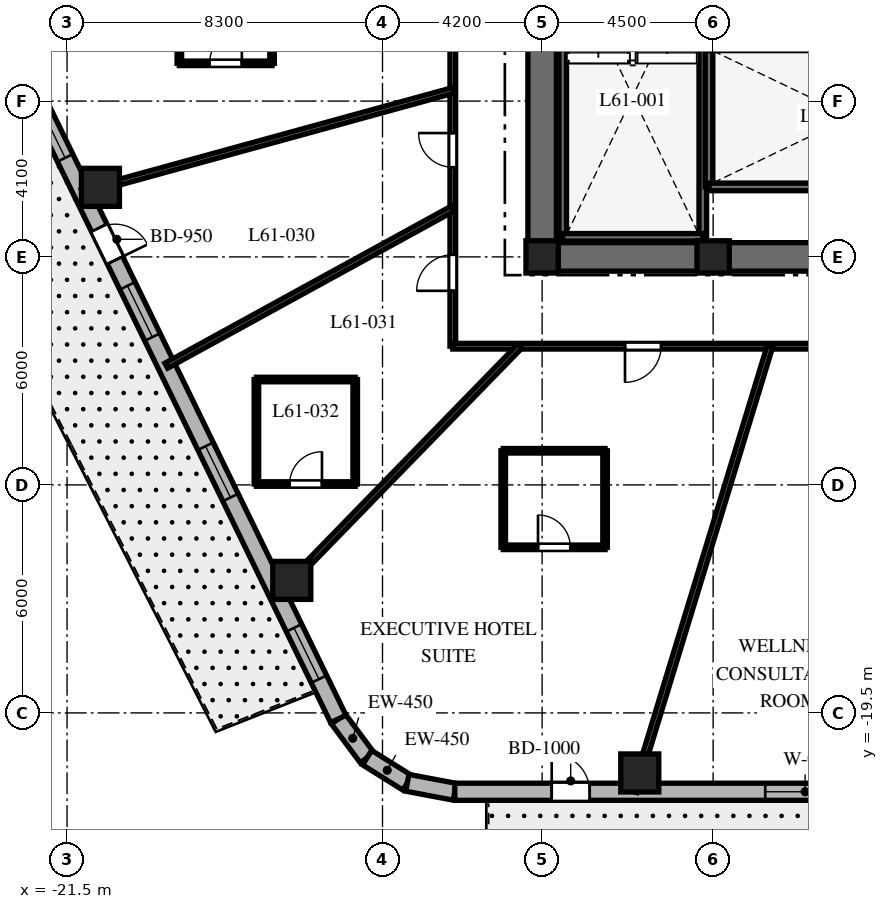
"""IFC4 building model, lengths in metres.
Left out: names, types, materials, properties, quantities, classifications, styles, units other than length and angle.
Written with IfcOpenShell. Run it as: python <this file> out.ifc"""

import sys

from ifc_helpers import new_model, si_unit, direction, frame, frame_2d, origin, origin_2d, place, context, subcontext, project, spatial, rectangle, extrude, element, fill, save


model = new_model("IFC4")
c1 = context("Model", 3, precision=1e-05, world=origin(), true_north=direction((0.0, 1.0)))
c2 = subcontext(c1, "Body", "Model", "MODEL_VIEW")
j1 = project(units=[si_unit("LENGTHUNIT", "METRE"), si_unit("PLANEANGLEUNIT", "RADIAN")], contexts=[c1])
p1 = place(None, origin())
s1 = spatial("IfcSite", under=j1, at=p1, CompositionType="ELEMENT")
p2 = place(p1, origin())
s2 = spatial("IfcBuilding", under=s1, at=p2, CompositionType="ELEMENT")
p3 = place(p2, frame((0.0, 0.0, 244.5)))
s3 = spatial("IfcBuildingStorey", under=s2, at=p3, CompositionType="ELEMENT", Elevation=244.5)
p4 = place(p3, frame((-9.375, -7.5, 0.0), z_axis=(0.0, 0.0, 1.0), x_axis=(1.0, 0.0, 0.0)))
e1 = element("IfcWall", 1, at=p4, inside=s3, PredefinedType="SHEAR", context=c2, shape_type="SweptSolid", body=[
    extrude(rectangle(XDim=18.75, YDim=0.75, at=frame_2d((9.375, 0.0))), origin(), (0.0, 0.0, 1.0), 3.8),
])
p5 = place(p4, frame((9.425, 0.0, 0.0)))
e2 = element("IfcOpeningElement", 2, at=p5, cuts=e1, PredefinedType="OPENING", context=c2, shape_type="SweptSolid", body=[
    extrude(rectangle(XDim=1.0, YDim=2.15, at=frame_2d((0.5, 1.075))), frame((0.0, 0.385, 0.0), z_axis=(0.0, -1.0, 0.0), x_axis=(1.0, 0.0, 0.0)), (0.0, 0.0, 1.0), 0.77),
])
p6 = place(p3, frame((-9.0, -7.125, 0.0), z_axis=(0.0, 0.0, 1.0), x_axis=(0.0, 1.0, 0.0)))
e3 = element("IfcWall", 3, at=p6, inside=s3, PredefinedType="SHEAR", context=c2, shape_type="SweptSolid", body=[
    extrude(rectangle(XDim=14.25, YDim=0.75, at=frame_2d((7.125, 0.0))), origin(), (0.0, 0.0, 1.0), 3.8),
])
p7 = place(p6, frame((10.25, 0.0, 0.0)))
e4 = element("IfcOpeningElement", 4, at=p7, cuts=e3, PredefinedType="OPENING", context=c2, shape_type="SweptSolid", body=[
    extrude(rectangle(XDim=1.05, YDim=2.15, at=frame_2d((0.525, 1.075))), frame((0.0, 0.385, 0.0), z_axis=(0.0, -1.0, 0.0), x_axis=(1.0, 0.0, 0.0)), (0.0, 0.0, 1.0), 0.77),
])
for number, where, z_axis, x_axis in (
    (5, (-8.458, -6.985, 0.0), (0.0, 0.0, 1.0), (0.0, 1.0, 0.0)),
    (6, (-4.772, -6.985, 0.0), (0.0, 0.0, 1.0), (0.0, 1.0, 0.0)),
):
    element("IfcWall", number, at=place(p3, frame(where, z_axis=z_axis, x_axis=x_axis)), inside=s3, PredefinedType="SHEAR", context=c2, shape_type="SweptSolid", body=[
        extrude(rectangle(XDim=9.143, YDim=0.2, at=frame_2d((4.572, 0.0))), origin(), (0.0, 0.0, 1.0), 3.8),
    ])
for number, where, z_axis, x_axis in (
    (7, (-8.458, -6.985, 0.0), (0.0, 0.0, 1.0), (1.0, 0.0, 0.0)),
    (8, (-4.608, -5.658, 0.0), (0.0, 0.0, 1.0), (0.0, 1.0, 0.0)),
):
    element("IfcWall", number, at=place(p3, frame(where, z_axis=z_axis, x_axis=x_axis)), inside=s3, PredefinedType="SHEAR", context=c2, shape_type="SweptSolid", body=[
        extrude(rectangle(XDim=3.686, YDim=0.2, at=frame_2d((1.843, 0.0))), origin(), (0.0, 0.0, 1.0), 3.8),
    ])
p8 = place(p3, frame((-4.608, -5.658, 0.0), z_axis=(0.0, 0.0, 1.0), x_axis=(1.0, 0.0, 0.0)))
e9 = element("IfcWall", 9, at=p8, inside=s3, PredefinedType="SHEAR", context=c2, shape_type="SweptSolid", body=[
    extrude(rectangle(XDim=9.166, YDim=0.2, at=frame_2d((4.583, 0.0))), origin(), (0.0, 0.0, 1.0), 3.8),
])
p9 = place(p8, frame((7.45, 0.0, 0.0)))
e10 = element("IfcOpeningElement", 10, at=p9, cuts=e9, PredefinedType="OPENING", context=c2, shape_type="SweptSolid", body=[
    extrude(rectangle(XDim=1.0, YDim=2.15, at=frame_2d((0.5, 1.075))), frame((0.0, 0.11, 0.0), z_axis=(0.0, -1.0, 0.0), x_axis=(1.0, 0.0, 0.0)), (0.0, 0.0, 1.0), 0.22),
])
for number, where, z_axis, x_axis in (
    (11, (-9.0, -7.5, 0.0), (0.0, 0.0, 1.0), (1.0, 0.0, 0.0)),
    (12, (-4.5, -7.5, 0.0), (0.0, 0.0, 1.0), (1.0, 0.0, 0.0)),
):
    element("IfcColumn", number, at=place(p3, frame(where, z_axis=z_axis, x_axis=x_axis)), inside=s3, PredefinedType="COLUMN", context=c2, shape_type="SweptSolid", body=[
        extrude(rectangle(XDim=0.85, YDim=0.85, at=origin_2d()), origin(), (0.0, 0.0, 1.0), 3.8),
    ])
for number, where, z_axis, x_axis in (
    (13, (-6.43, -21.08, 0.0), (0.0, 0.0, 1.0), (1.0, 0.0, 0.0)),
    (14, (-20.622, -5.67, 0.0), (0.0, 0.0, 1.0), (1.0, 0.0, 0.0)),
    (15, (-15.587, -16.013, 0.0), (0.0, 0.0, 1.0), (1.0, 0.0, 0.0)),
):
    element("IfcColumn", number, at=place(p3, frame(where, z_axis=z_axis, x_axis=x_axis)), inside=s3, PredefinedType="COLUMN", context=c2, shape_type="SweptSolid", body=[
        extrude(rectangle(XDim=1.0, YDim=1.0, at=origin_2d()), origin(), (0.0, 0.0, 1.0), 3.8),
    ])
p10 = place(p3, frame((-14.362, -19.658, 0.0), z_axis=(0.0, 0.0, 1.0), x_axis=(0.596642462792, -0.80250717853, 0.0)))
e16 = element("IfcWall", 16, at=p10, inside=s3, PredefinedType="SOLIDWALL", context=c2, shape_type="SweptSolid", body=[
    extrude(rectangle(XDim=1.27, YDim=0.45, at=frame_2d((0.635, 0.0))), origin(), (0.0, 0.0, 1.0), 3.5),
])
p11 = place(p3, frame((-13.604, -20.678, 0.0), z_axis=(0.0, 0.0, 1.0), x_axis=(0.847910404124, -0.53013955387, 0.0)))
e17 = element("IfcWall", 17, at=p11, inside=s3, PredefinedType="SOLIDWALL", context=c2, shape_type="SweptSolid", body=[
    extrude(rectangle(XDim=1.249, YDim=0.45, at=frame_2d((0.624, 0.0))), origin(), (0.0, 0.0, 1.0), 3.5),
])
p12 = place(p3, frame((-12.546, -21.34, 0.0), z_axis=(0.0, 0.0, 1.0), x_axis=(0.982686750835, -0.18527479519, 0.0)))
e18 = element("IfcWall", 18, at=p12, inside=s3, PredefinedType="SOLIDWALL", context=c2, shape_type="SweptSolid", body=[
    extrude(rectangle(XDim=1.27, YDim=0.45, at=frame_2d((0.635, 0.0))), origin(), (0.0, 0.0, 1.0), 3.5),
])
p13 = place(p3, frame((-11.298, -21.575, 0.0), z_axis=(0.0, 0.0, 1.0), x_axis=(1.0, 0.0, 0.0)))
e19 = element("IfcWall", 19, at=p13, inside=s3, PredefinedType="SOLIDWALL", context=c2, shape_type="SweptSolid", body=[
    extrude(rectangle(XDim=24.399, YDim=0.45, at=frame_2d((12.2, 0.0))), origin(), (0.0, 0.0, 1.0), 3.5),
])
p14 = place(p13, frame((2.55, 0.0, 0.0)))
e20 = element("IfcOpeningElement", 20, at=p14, cuts=e19, PredefinedType="OPENING", context=c2, shape_type="SweptSolid", body=[
    extrude(rectangle(XDim=1.0, YDim=2.15, at=frame_2d((0.5, 1.075))), frame((0.0, 0.235, 0.0), z_axis=(0.0, -1.0, 0.0), x_axis=(1.0, 0.0, 0.0)), (0.0, 0.0, 1.0), 0.47),
])
p15 = place(p13, frame((8.169, 0.0, 0.8)))
e21 = element("IfcOpeningElement", 21, at=p15, cuts=e19, PredefinedType="OPENING", context=c2, shape_type="SweptSolid", body=[
    extrude(rectangle(XDim=2.1, YDim=1.85, at=frame_2d((1.05, 0.925))), frame((0.0, 0.235, 0.0), z_axis=(0.0, -1.0, 0.0), x_axis=(1.0, 0.0, 0.0)), (0.0, 0.0, 1.0), 0.47),
])
p16 = place(p13, frame((14.922, 0.0, 0.8)))
e22 = element("IfcOpeningElement", 22, at=p16, cuts=e19, PredefinedType="OPENING", context=c2, shape_type="SweptSolid", body=[
    extrude(rectangle(XDim=2.1, YDim=1.85, at=frame_2d((1.05, 0.925))), frame((0.0, 0.235, 0.0), z_axis=(0.0, -1.0, 0.0), x_axis=(1.0, 0.0, 0.0)), (0.0, 0.0, 1.0), 0.47),
])
p17 = place(p13, frame((20.996, 0.0, 0.8)))
e23 = element("IfcOpeningElement", 23, at=p17, cuts=e19, PredefinedType="OPENING", context=c2, shape_type="SweptSolid", body=[
    extrude(rectangle(XDim=2.1, YDim=1.85, at=frame_2d((1.05, 0.925))), frame((0.0, 0.235, 0.0), z_axis=(0.0, -1.0, 0.0), x_axis=(1.0, 0.0, 0.0)), (0.0, 0.0, 1.0), 0.47),
])
p18 = place(p3, frame((-22.74, -2.452, 0.0), z_axis=(0.0, 0.0, 1.0), x_axis=(0.437753424814, -0.899095066755, 0.0)))
e24 = element("IfcWall", 24, at=p18, inside=s3, PredefinedType="SOLIDWALL", context=c2, shape_type="SweptSolid", body=[
    extrude(rectangle(XDim=19.137, YDim=0.45, at=frame_2d((9.569, 0.0))), origin(), (0.0, 0.0, 1.0), 3.5),
])
p19 = place(p18, frame((4.763, 0.0, 0.0)))
e25 = element("IfcOpeningElement", 25, at=p19, cuts=e24, PredefinedType="OPENING", context=c2, shape_type="SweptSolid", body=[
    extrude(rectangle(XDim=0.95, YDim=2.15, at=frame_2d((0.475, 1.075))), frame((0.0, 0.235, 0.0), z_axis=(0.0, -1.0, 0.0), x_axis=(1.0, 0.0, 0.0)), (0.0, 0.0, 1.0), 0.47),
])
p20 = place(p18, frame((1.216, 0.0, 0.8)))
e26 = element("IfcOpeningElement", 26, at=p20, cuts=e24, PredefinedType="OPENING", context=c2, shape_type="SweptSolid", body=[
    extrude(rectangle(XDim=1.5, YDim=1.8, at=frame_2d((0.75, 0.9))), frame((0.0, 0.235, 0.0), z_axis=(0.0, -1.0, 0.0), x_axis=(1.0, 0.0, 0.0)), (0.0, 0.0, 1.0), 0.47),
])
p21 = place(p18, frame((6.461, 0.0, 0.8)))
e27 = element("IfcOpeningElement", 27, at=p21, cuts=e24, PredefinedType="OPENING", context=c2, shape_type="SweptSolid", body=[
    extrude(rectangle(XDim=1.5, YDim=1.8, at=frame_2d((0.75, 0.9))), frame((0.0, 0.235, 0.0), z_axis=(0.0, -1.0, 0.0), x_axis=(1.0, 0.0, 0.0)), (0.0, 0.0, 1.0), 0.47),
])
p22 = place(p18, frame((11.156, 0.0, 0.8)))
e28 = element("IfcOpeningElement", 28, at=p22, cuts=e24, PredefinedType="OPENING", context=c2, shape_type="SweptSolid", body=[
    extrude(rectangle(XDim=1.5, YDim=1.8, at=frame_2d((0.75, 0.9))), frame((0.0, 0.235, 0.0), z_axis=(0.0, -1.0, 0.0), x_axis=(1.0, 0.0, 0.0)), (0.0, 0.0, 1.0), 0.47),
])
p23 = place(p18, frame((16.473, 0.0, 0.8)))
e29 = element("IfcOpeningElement", 29, at=p23, cuts=e24, PredefinedType="OPENING", context=c2, shape_type="SweptSolid", body=[
    extrude(rectangle(XDim=1.5, YDim=1.8, at=frame_2d((0.75, 0.9))), frame((0.0, 0.235, 0.0), z_axis=(0.0, -1.0, 0.0), x_axis=(1.0, 0.0, 0.0)), (0.0, 0.0, 1.0), 0.47),
])
p24 = place(p3, frame((-11.35, -9.85, 0.0), z_axis=(0.0, 0.0, 1.0), x_axis=(0.0, 1.0, 0.0)))
e30 = element("IfcWall", 30, at=p24, inside=s3, PredefinedType="PARTITIONING", context=c2, shape_type="SweptSolid", body=[
    extrude(rectangle(XDim=12.4, YDim=0.15, at=frame_2d((6.2, 0.0))), origin(), (0.0, 0.0, 1.0), 2.99),
])
p25 = place(p24, frame((8.835, 0.0, 0.0)))
e31 = element("IfcOpeningElement", 31, at=p25, cuts=e30, PredefinedType="OPENING", context=c2, shape_type="SweptSolid", body=[
    extrude(rectangle(XDim=0.95, YDim=2.03, at=frame_2d((0.475, 1.015))), frame((0.0, 0.085, 0.0), z_axis=(0.0, -1.0, 0.0), x_axis=(1.0, 0.0, 0.0)), (0.0, 0.0, 1.0), 0.17),
])
p26 = place(p24, frame((4.709, 0.0, 0.0)))
e32 = element("IfcOpeningElement", 32, at=p26, cuts=e30, PredefinedType="OPENING", context=c2, shape_type="SweptSolid", body=[
    extrude(rectangle(XDim=0.9, YDim=2.03, at=frame_2d((0.45, 1.015))), frame((0.0, 0.085, 0.0), z_axis=(0.0, -1.0, 0.0), x_axis=(1.0, 0.0, 0.0)), (0.0, 0.0, 1.0), 0.17),
])
p27 = place(p24, frame((1.457, 0.0, 0.0)))
e33 = element("IfcOpeningElement", 33, at=p27, cuts=e30, PredefinedType="OPENING", context=c2, shape_type="SweptSolid", body=[
    extrude(rectangle(XDim=0.95, YDim=2.03, at=frame_2d((0.475, 1.015))), frame((0.0, 0.085, 0.0), z_axis=(0.0, -1.0, 0.0), x_axis=(1.0, 0.0, 0.0)), (0.0, 0.0, 1.0), 0.17),
])
p28 = place(p3, frame((-0.92, -9.85, 0.0), z_axis=(0.0, 0.0, 1.0), x_axis=(-1.0, 0.0, 0.0)))
e34 = element("IfcWall", 34, at=p28, inside=s3, PredefinedType="PARTITIONING", context=c2, shape_type="SweptSolid", body=[
    extrude(rectangle(XDim=10.43, YDim=0.15, at=frame_2d((5.215, 0.0))), origin(), (0.0, 0.0, 1.0), 2.99),
])
p29 = place(p28, frame((4.949, 0.0, 0.0)))
e35 = element("IfcOpeningElement", 35, at=p29, cuts=e34, PredefinedType="OPENING", context=c2, shape_type="SweptSolid", body=[
    extrude(rectangle(XDim=0.95, YDim=2.03, at=frame_2d((0.475, 1.015))), frame((0.0, 0.085, 0.0), z_axis=(0.0, -1.0, 0.0), x_axis=(1.0, 0.0, 0.0)), (0.0, 0.0, 1.0), 0.17),
])
p30 = place(p3, frame((-11.35, -3.121, 0.0), z_axis=(0.0, 0.0, 1.0), x_axis=(-0.964212793822, -0.265129568758, 0.0)))
e36 = element("IfcWall", 36, at=p30, inside=s3, PredefinedType="PARTITIONING", context=c2, shape_type="SweptSolid", body=[
    extrude(rectangle(XDim=10.12, YDim=0.15, at=frame_2d((5.06, 0.0))), origin(), (0.0, 0.0, 1.0), 2.74),
])
p31 = place(p3, frame((-11.35, -6.227, 0.0), z_axis=(0.0, 0.0, 1.0), x_axis=(-0.876723190824, -0.480995266786, 0.0)))
e37 = element("IfcWall", 37, at=p31, inside=s3, PredefinedType="PARTITIONING", context=c2, shape_type="SweptSolid", body=[
    extrude(rectangle(XDim=8.598, YDim=0.15, at=frame_2d((4.299, 0.0))), origin(), (0.0, 0.0, 1.0), 2.74),
])
p32 = place(p3, frame((-9.588, -9.85, 0.0), z_axis=(0.0, 0.0, 1.0), x_axis=(-0.697519469595, -0.716565830567, 0.0)))
e38 = element("IfcWall", 38, at=p32, inside=s3, PredefinedType="PARTITIONING", context=c2, shape_type="SweptSolid", body=[
    extrude(rectangle(XDim=9.126, YDim=0.15, at=frame_2d((4.563, 0.0))), origin(), (0.0, 0.0, 1.0), 2.74),
])
p33 = place(p3, frame((-3.004, -9.85, 0.0), z_axis=(0.0, 0.0, 1.0), x_axis=(-0.291775760688, -0.956486751333, 0.0)))
e39 = element("IfcWall", 39, at=p33, inside=s3, PredefinedType="PARTITIONING", context=c2, shape_type="SweptSolid", body=[
    extrude(rectangle(XDim=12.258, YDim=0.15, at=frame_2d((6.129, 0.0))), origin(), (0.0, 0.0, 1.0), 2.74),
])
p34 = place(p3, frame((-18.546, -2.406, 0.0), z_axis=(0.0, 0.0, 1.0), x_axis=(1.0, 0.0, 0.0)))
e40 = element("IfcWall", 40, at=p34, inside=s3, PredefinedType="PARTITIONING", context=c2, shape_type="SweptSolid", body=[
    extrude(rectangle(XDim=2.44, YDim=0.12, at=frame_2d((1.22, 0.0))), origin(), (0.0, 0.0, 1.0), 2.94),
])
p35 = place(p34, frame((0.795, 0.0, 0.0)))
e41 = element("IfcOpeningElement", 41, at=p35, cuts=e40, PredefinedType="OPENING", context=c2, shape_type="SweptSolid", body=[
    extrude(rectangle(XDim=0.85, YDim=2.03, at=frame_2d((0.425, 1.015))), frame((0.0, 0.07, 0.0), z_axis=(0.0, -1.0, 0.0), x_axis=(1.0, 0.0, 0.0)), (0.0, 0.0, 1.0), 0.14),
])
for number, where, z_axis, x_axis in (
    (42, (-16.106, -2.406, 0.0), (0.0, 0.0, 1.0), (0.0, 1.0, 0.0)),
    (43, (-18.546, 0.204, 0.0), (0.0, 0.0, 1.0), (0.0, -1.0, 0.0)),
):
    element("IfcWall", number, at=place(p3, frame(where, z_axis=z_axis, x_axis=x_axis)), inside=s3, PredefinedType="PARTITIONING", context=c2, shape_type="SweptSolid", body=[
        extrude(rectangle(XDim=2.61, YDim=0.12, at=frame_2d((1.305, 0.0))), origin(), (0.0, 0.0, 1.0), 3.5),
    ])
p36 = place(p3, frame((-16.518, -13.477, 0.0), z_axis=(0.0, 0.0, 1.0), x_axis=(1.0, 0.0, 0.0)))
e44 = element("IfcWall", 44, at=p36, inside=s3, PredefinedType="PARTITIONING", context=c2, shape_type="SweptSolid", body=[
    extrude(rectangle(XDim=2.6, YDim=0.12, at=frame_2d((1.3, 0.0))), origin(), (0.0, 0.0, 1.0), 3.5),
])
p37 = place(p36, frame((0.875, 0.0, 0.0)))
e45 = element("IfcOpeningElement", 45, at=p37, cuts=e44, PredefinedType="OPENING", context=c2, shape_type="SweptSolid", body=[
    extrude(rectangle(XDim=0.85, YDim=2.03, at=frame_2d((0.425, 1.015))), frame((0.0, 0.07, 0.0), z_axis=(0.0, -1.0, 0.0), x_axis=(1.0, 0.0, 0.0)), (0.0, 0.0, 1.0), 0.14),
])
p38 = place(p3, frame((-13.918, -13.477, 0.0), z_axis=(0.0, 0.0, 1.0), x_axis=(0.0, 1.0, 0.0)))
e46 = element("IfcWall", 46, at=p38, inside=s3, PredefinedType="PARTITIONING", context=c2, shape_type="SweptSolid", body=[
    extrude(rectangle(XDim=2.75, YDim=0.12, at=frame_2d((1.375, 0.0))), origin(), (0.0, 0.0, 1.0), 3.027),
])
p39 = place(p3, frame((-13.918, -10.727, 0.0), z_axis=(0.0, 0.0, 1.0), x_axis=(-1.0, 0.0, 0.0)))
e47 = element("IfcWall", 47, at=p39, inside=s3, PredefinedType="PARTITIONING", context=c2, shape_type="SweptSolid", body=[
    extrude(rectangle(XDim=2.6, YDim=0.12, at=frame_2d((1.3, 0.0))), origin(), (0.0, 0.0, 1.0), 3.027),
])
p40 = place(p3, frame((-16.518, -10.727, 0.0), z_axis=(0.0, 0.0, 1.0), x_axis=(0.0, -1.0, 0.0)))
e48 = element("IfcWall", 48, at=p40, inside=s3, PredefinedType="PARTITIONING", context=c2, shape_type="SweptSolid", body=[
    extrude(rectangle(XDim=2.75, YDim=0.12, at=frame_2d((1.375, 0.0))), origin(), (0.0, 0.0, 1.0), 3.5),
])
p41 = place(p3, frame((-10.023, -15.142, 0.0), z_axis=(0.0, 0.0, 1.0), x_axis=(1.0, 0.0, 0.0)))
e49 = element("IfcWall", 49, at=p41, inside=s3, PredefinedType="PARTITIONING", context=c2, shape_type="SweptSolid", body=[
    extrude(rectangle(XDim=2.68, YDim=0.12, at=frame_2d((1.34, 0.0))), origin(), (0.0, 0.0, 1.0), 3.073),
])
p42 = place(p41, frame((0.915, 0.0, 0.0)))
e50 = element("IfcOpeningElement", 50, at=p42, cuts=e49, PredefinedType="OPENING", context=c2, shape_type="SweptSolid", body=[
    extrude(rectangle(XDim=0.85, YDim=2.03, at=frame_2d((0.425, 1.015))), frame((0.0, 0.07, 0.0), z_axis=(0.0, -1.0, 0.0), x_axis=(1.0, 0.0, 0.0)), (0.0, 0.0, 1.0), 0.14),
])
p43 = place(p3, frame((-7.343, -15.142, 0.0), z_axis=(0.0, 0.0, 1.0), x_axis=(0.0, 1.0, 0.0)))
e51 = element("IfcWall", 51, at=p43, inside=s3, PredefinedType="PARTITIONING", context=c2, shape_type="SweptSolid", body=[
    extrude(rectangle(XDim=2.54, YDim=0.12, at=frame_2d((1.27, 0.0))), origin(), (0.0, 0.0, 1.0), 2.94),
])
p44 = place(p3, frame((-7.343, -12.602, 0.0), z_axis=(0.0, 0.0, 1.0), x_axis=(-1.0, 0.0, 0.0)))
e52 = element("IfcWall", 52, at=p44, inside=s3, PredefinedType="PARTITIONING", context=c2, shape_type="SweptSolid", body=[
    extrude(rectangle(XDim=2.68, YDim=0.12, at=frame_2d((1.34, 0.0))), origin(), (0.0, 0.0, 1.0), 2.94),
])
p45 = place(p3, frame((-10.023, -12.602, 0.0), z_axis=(0.0, 0.0, 1.0), x_axis=(0.0, -1.0, 0.0)))
e53 = element("IfcWall", 53, at=p45, inside=s3, PredefinedType="PARTITIONING", context=c2, shape_type="SweptSolid", body=[
    extrude(rectangle(XDim=2.54, YDim=0.12, at=frame_2d((1.27, 0.0))), origin(), (0.0, 0.0, 1.0), 3.073),
])
p46 = place(p14, origin())
e54 = element("IfcDoor", 54, at=p46, inside=s3, OperationType="SINGLE_SWING_LEFT", PredefinedType="DOOR", context=c2, shape_type="SweptSolid", body=[
    extrude(rectangle(XDim=1.0, YDim=2.15, at=frame_2d((0.5, 1.075))), frame((0.0, 0.025, 0.0), z_axis=(0.0, -1.0, 0.0), x_axis=(1.0, 0.0, 0.0)), (0.0, 0.0, 1.0), 0.05),
])
fill(e20, e54)
p47 = place(p15, origin())
e55 = element("IfcWindow", 55, at=p47, inside=s3, PartitioningType="SINGLE_PANEL", PredefinedType="WINDOW", context=c2, shape_type="SweptSolid", body=[
    extrude(rectangle(XDim=2.1, YDim=1.85, at=frame_2d((1.05, 0.925))), frame((0.0, 0.03, 0.0), z_axis=(0.0, -1.0, 0.0), x_axis=(1.0, 0.0, 0.0)), (0.0, 0.0, 1.0), 0.06),
])
fill(e21, e55)
p48 = place(p19, origin())
e56 = element("IfcDoor", 56, at=p48, inside=s3, OperationType="SINGLE_SWING_RIGHT", PredefinedType="DOOR", context=c2, shape_type="SweptSolid", body=[
    extrude(rectangle(XDim=0.95, YDim=2.15, at=frame_2d((0.475, 1.075))), frame((0.0, 0.025, 0.0), z_axis=(0.0, -1.0, 0.0), x_axis=(1.0, 0.0, 0.0)), (0.0, 0.0, 1.0), 0.05),
])
fill(e25, e56)
p49 = place(p20, origin())
e57 = element("IfcWindow", 57, at=p49, inside=s3, PartitioningType="SINGLE_PANEL", PredefinedType="WINDOW", context=c2, shape_type="SweptSolid", body=[
    extrude(rectangle(XDim=1.5, YDim=1.8, at=frame_2d((0.75, 0.9))), frame((0.0, 0.03, 0.0), z_axis=(0.0, -1.0, 0.0), x_axis=(1.0, 0.0, 0.0)), (0.0, 0.0, 1.0), 0.06),
])
fill(e26, e57)
p50 = place(p21, origin())
e58 = element("IfcWindow", 58, at=p50, inside=s3, PartitioningType="SINGLE_PANEL", PredefinedType="WINDOW", context=c2, shape_type="SweptSolid", body=[
    extrude(rectangle(XDim=1.5, YDim=1.8, at=frame_2d((0.75, 0.9))), frame((0.0, 0.03, 0.0), z_axis=(0.0, -1.0, 0.0), x_axis=(1.0, 0.0, 0.0)), (0.0, 0.0, 1.0), 0.06),
])
fill(e27, e58)
p51 = place(p22, origin())
e59 = element("IfcWindow", 59, at=p51, inside=s3, PartitioningType="SINGLE_PANEL", PredefinedType="WINDOW", context=c2, shape_type="SweptSolid", body=[
    extrude(rectangle(XDim=1.5, YDim=1.8, at=frame_2d((0.75, 0.9))), frame((0.0, 0.03, 0.0), z_axis=(0.0, -1.0, 0.0), x_axis=(1.0, 0.0, 0.0)), (0.0, 0.0, 1.0), 0.06),
])
fill(e28, e59)
p52 = place(p23, origin())
e60 = element("IfcWindow", 60, at=p52, inside=s3, PartitioningType="SINGLE_PANEL", PredefinedType="WINDOW", context=c2, shape_type="SweptSolid", body=[
    extrude(rectangle(XDim=1.5, YDim=1.8, at=frame_2d((0.75, 0.9))), frame((0.0, 0.03, 0.0), z_axis=(0.0, -1.0, 0.0), x_axis=(1.0, 0.0, 0.0)), (0.0, 0.0, 1.0), 0.06),
])
fill(e29, e60)
p53 = place(p35, origin())
e61 = element("IfcDoor", 61, at=p53, inside=s3, OperationType="SINGLE_SWING_RIGHT", PredefinedType="DOOR", context=c2, shape_type="SweptSolid", body=[
    extrude(rectangle(XDim=0.85, YDim=2.03, at=frame_2d((0.425, 1.015))), frame((0.0, 0.025, 0.0), z_axis=(0.0, -1.0, 0.0), x_axis=(1.0, 0.0, 0.0)), (0.0, 0.0, 1.0), 0.05),
])
fill(e41, e61)
p54 = place(p26, origin())
e62 = element("IfcDoor", 62, at=p54, inside=s3, OperationType="SINGLE_SWING_RIGHT", PredefinedType="DOOR", context=c2, shape_type="SweptSolid", body=[
    extrude(rectangle(XDim=0.9, YDim=2.03, at=frame_2d((0.45, 1.015))), frame((0.0, 0.025, 0.0), z_axis=(0.0, -1.0, 0.0), x_axis=(1.0, 0.0, 0.0)), (0.0, 0.0, 1.0), 0.05),
])
fill(e32, e62)
p55 = place(p27, origin())
e63 = element("IfcDoor", 63, at=p55, inside=s3, OperationType="SINGLE_SWING_LEFT", PredefinedType="DOOR", context=c2, shape_type="SweptSolid", body=[
    extrude(rectangle(XDim=0.95, YDim=2.03, at=frame_2d((0.475, 1.015))), frame((0.0, 0.025, 0.0), z_axis=(0.0, -1.0, 0.0), x_axis=(1.0, 0.0, 0.0)), (0.0, 0.0, 1.0), 0.05),
])
fill(e33, e63)
p56 = place(p37, origin())
e64 = element("IfcDoor", 64, at=p56, inside=s3, OperationType="SINGLE_SWING_RIGHT", PredefinedType="DOOR", context=c2, shape_type="SweptSolid", body=[
    extrude(rectangle(XDim=0.85, YDim=2.03, at=frame_2d((0.425, 1.015))), frame((0.0, 0.025, 0.0), z_axis=(0.0, -1.0, 0.0), x_axis=(1.0, 0.0, 0.0)), (0.0, 0.0, 1.0), 0.05),
])
fill(e45, e64)
p57 = place(p29, origin())
e65 = element("IfcDoor", 65, at=p57, inside=s3, OperationType="SINGLE_SWING_RIGHT", PredefinedType="DOOR", context=c2, shape_type="SweptSolid", body=[
    extrude(rectangle(XDim=0.95, YDim=2.03, at=frame_2d((0.475, 1.015))), frame((0.0, 0.025, 0.0), z_axis=(0.0, -1.0, 0.0), x_axis=(1.0, 0.0, 0.0)), (0.0, 0.0, 1.0), 0.05),
])
fill(e35, e65)
p58 = place(p42, origin())
e66 = element("IfcDoor", 66, at=p58, inside=s3, OperationType="SINGLE_SWING_LEFT", PredefinedType="DOOR", context=c2, shape_type="SweptSolid", body=[
    extrude(rectangle(XDim=0.85, YDim=2.03, at=frame_2d((0.425, 1.015))), frame((0.0, 0.025, 0.0), z_axis=(0.0, -1.0, 0.0), x_axis=(1.0, 0.0, 0.0)), (0.0, 0.0, 1.0), 0.05),
])
fill(e50, e66)
save(model, sys.argv[1])
